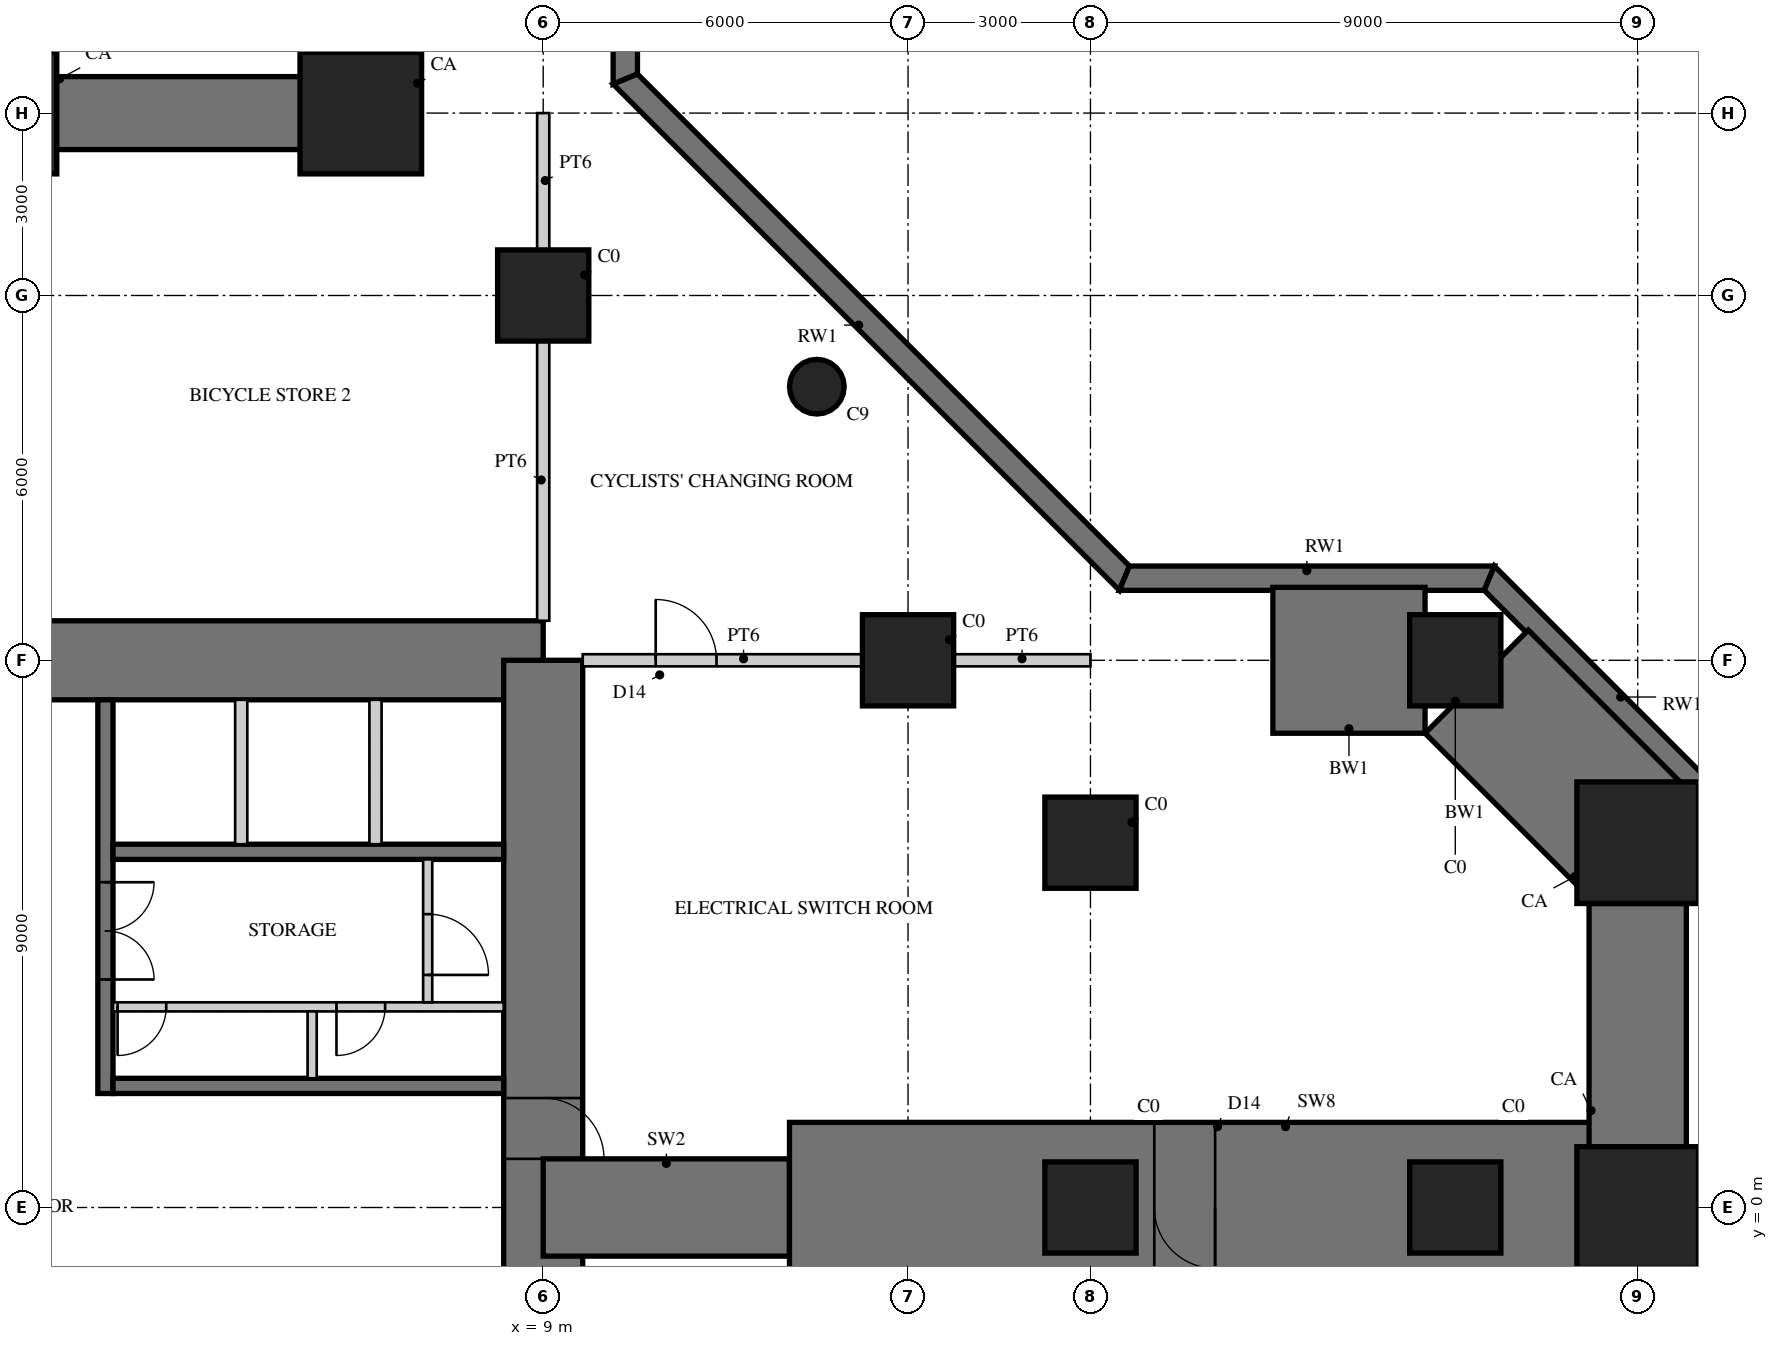
"""IFC4 building model, lengths in metres.
Left out: names, types, materials, properties, quantities, classifications, styles, units other than length and angle.
Written with IfcOpenShell. Run it as: python <this file> out.ifc"""

import sys

from ifc_helpers import new_model, si_unit, direction, frame, frame_2d, origin, origin_2d, place, context, subcontext, project, spatial, polyline, rectangle, circle, outline, extrude, element, fill, save


model = new_model("IFC4")
c1 = context("Model", 3, precision=1e-05, world=origin(), true_north=direction((0.0, 1.0)))
c2 = subcontext(c1, "Body", "Model", "MODEL_VIEW")
j1 = project(units=[si_unit("LENGTHUNIT", "METRE"), si_unit("PLANEANGLEUNIT", "RADIAN")], contexts=[c1])
p1 = place(None, origin())
s1 = spatial("IfcSite", under=j1, at=p1, CompositionType="ELEMENT")
p2 = place(p1, origin())
s2 = spatial("IfcBuilding", under=s1, at=p2, CompositionType="ELEMENT")
p3 = place(p2, frame((0.0, 0.0, -4.0)))
s3 = spatial("IfcBuildingStorey", under=s2, at=p3, CompositionType="ELEMENT", Elevation=-4.0)
p4 = place(p3, origin())
e1 = element("IfcWall", 1, at=p4, inside=s3, PredefinedType="SOLIDWALL", context=c2, shape_type="SweptSolid", body=[
    extrude(outline(polyline([(10.15, 24.476), (10.55, 24.642), (10.55, 18.642), (10.15, 18.476), (10.15, 24.476)])), origin(), (0.0, 0.0, 1.0), 4.0),
])
p5 = place(p3, origin())
e2 = element("IfcWall", 2, at=p5, inside=s3, PredefinedType="SOLIDWALL", context=c2, shape_type="SweptSolid", body=[
    extrude(outline(polyline([(10.15, 18.476), (10.55, 18.642), (18.642, 10.55), (18.476, 10.15), (10.15, 18.476)])), origin(), (0.0, 0.0, 1.0), 4.0),
])
p6 = place(p3, origin())
e3 = element("IfcWall", 3, at=p6, inside=s3, PredefinedType="SOLIDWALL", context=c2, shape_type="SweptSolid", body=[
    extrude(outline(polyline([(18.476, 10.15), (18.642, 10.55), (24.642, 10.55), (24.476, 10.15), (18.476, 10.15)])), origin(), (0.0, 0.0, 1.0), 4.0),
])
p7 = place(p3, origin())
e4 = element("IfcWall", 4, at=p7, inside=s3, PredefinedType="SOLIDWALL", context=c2, shape_type="SweptSolid", body=[
    extrude(outline(polyline([(24.476, 10.15), (24.642, 10.55), (28.55, 6.642), (28.15, 6.476), (24.476, 10.15)])), origin(), (0.0, 0.0, 1.0), 4.0),
])
p8 = place(p3, frame((9.0, 9.0, 0.0), z_axis=(0.0, 0.0, 1.0), x_axis=(-1.0, 0.0, 0.0)))
e5 = element("IfcWall", 5, at=p8, inside=s3, PredefinedType="SHEAR", context=c2, shape_type="SweptSolid", body=[
    extrude(rectangle(XDim=18.0, YDim=1.3, at=frame_2d((9.0, 0.0))), origin(), (0.0, 0.0, 1.0), 4.0),
])
p9 = place(p8, frame((9.8, 0.0, 0.0)))
e6 = element("IfcOpeningElement", 6, at=p9, cuts=e5, PredefinedType="OPENING", context=c2, shape_type="SweptSolid", body=[
    extrude(rectangle(XDim=1.0, YDim=2.4, at=frame_2d((0.5, 1.2))), frame((0.0, 0.66, 0.0), z_axis=(0.0, -1.0, 0.0), x_axis=(1.0, 0.0, 0.0)), (0.0, 0.0, 1.0), 1.32),
])
p10 = place(p3, frame((9.0, -9.0, 0.0), z_axis=(0.0, 0.0, 1.0), x_axis=(0.0, 1.0, 0.0)))
e7 = element("IfcWall", 7, at=p10, inside=s3, PredefinedType="SHEAR", context=c2, shape_type="SweptSolid", body=[
    extrude(rectangle(XDim=18.0, YDim=1.3, at=frame_2d((9.0, 0.0))), origin(), (0.0, 0.0, 1.0), 4.0),
])
p11 = place(p10, frame((9.8, 0.0, 0.0)))
e8 = element("IfcOpeningElement", 8, at=p11, cuts=e7, PredefinedType="OPENING", context=c2, shape_type="SweptSolid", body=[
    extrude(rectangle(XDim=1.0, YDim=2.4, at=frame_2d((0.5, 1.2))), frame((0.0, 0.66, 0.0), z_axis=(0.0, -1.0, 0.0), x_axis=(1.0, 0.0, 0.0)), (0.0, 0.0, 1.0), 1.32),
])
p12 = place(p3, frame((1.8, 1.875, 0.0), z_axis=(0.0, 0.0, 1.0), x_axis=(0.0, 1.0, 0.0)))
e9 = element("IfcWall", 9, at=p12, inside=s3, PredefinedType="SHEAR", context=c2, shape_type="SweptSolid", body=[
    extrude(rectangle(XDim=6.475, YDim=0.25, at=frame_2d((3.238, 0.0))), origin(), (0.0, 0.0, 1.0), 4.0),
])
p13 = place(p12, frame((1.875, 0.0, 0.0)))
e10 = element("IfcOpeningElement", 10, at=p13, cuts=e9, PredefinedType="OPENING", context=c2, shape_type="SweptSolid", body=[
    extrude(rectangle(XDim=1.6, YDim=2.4, at=frame_2d((0.8, 1.2))), frame((0.0, 0.135, 0.0), z_axis=(0.0, -1.0, 0.0), x_axis=(1.0, 0.0, 0.0)), (0.0, 0.0, 1.0), 0.27),
])
for number, where, z_axis, x_axis in (
    (11, (1.925, 2.0, 0.0), (0.0, 0.0, 1.0), (1.0, 0.0, 0.0)),
    (12, (1.925, 5.85, 0.0), (0.0, 0.0, 1.0), (1.0, 0.0, 0.0)),
):
    element("IfcWall", number, at=place(p3, frame(where, z_axis=z_axis, x_axis=x_axis)), inside=s3, PredefinedType="SHEAR", context=c2, shape_type="SweptSolid", body=[
        extrude(rectangle(XDim=6.425, YDim=0.25, at=frame_2d((3.212, 0.0))), origin(), (0.0, 0.0, 1.0), 4.0),
    ])
p14 = place(p3, frame((1.925, 3.3, 0.0), z_axis=(0.0, 0.0, 1.0), x_axis=(1.0, 0.0, 0.0)))
e13 = element("IfcWall", 13, at=p14, inside=s3, PredefinedType="PARTITIONING", context=c2, shape_type="SweptSolid", body=[
    extrude(rectangle(XDim=6.425, YDim=0.15, at=frame_2d((3.212, 0.0))), origin(), (0.0, 0.0, 1.0), 4.0),
])
p15 = place(p14, frame((0.075, 0.0, 0.0)))
e14 = element("IfcOpeningElement", 14, at=p15, cuts=e13, PredefinedType="OPENING", context=c2, shape_type="SweptSolid", body=[
    extrude(rectangle(XDim=0.8, YDim=2.1, at=frame_2d((0.4, 1.05))), frame((0.0, 0.085, 0.0), z_axis=(0.0, -1.0, 0.0), x_axis=(1.0, 0.0, 0.0)), (0.0, 0.0, 1.0), 0.17),
])
p16 = place(p14, frame((3.675, 0.0, 0.0)))
e15 = element("IfcOpeningElement", 15, at=p16, cuts=e13, PredefinedType="OPENING", context=c2, shape_type="SweptSolid", body=[
    extrude(rectangle(XDim=0.8, YDim=2.1, at=frame_2d((0.4, 1.05))), frame((0.0, 0.085, 0.0), z_axis=(0.0, -1.0, 0.0), x_axis=(1.0, 0.0, 0.0)), (0.0, 0.0, 1.0), 0.17),
])
p17 = place(p3, frame((5.2, 2.125, 0.0), z_axis=(0.0, 0.0, 1.0), x_axis=(0.0, 1.0, 0.0)))
e16 = element("IfcWall", 16, at=p17, inside=s3, PredefinedType="PARTITIONING", context=c2, shape_type="SweptSolid", body=[
    extrude(rectangle(XDim=1.1, YDim=0.15, at=frame_2d((0.55, 0.0))), origin(), (0.0, 0.0, 1.0), 4.0),
])
for number, where, z_axis, x_axis in (
    (17, (4.033, 5.975, 0.0), (0.0, 0.0, 1.0), (0.0, 1.0, 0.0)),
    (18, (6.242, 5.975, 0.0), (0.0, 0.0, 1.0), (0.0, 1.0, 0.0)),
):
    element("IfcWall", number, at=place(p3, frame(where, z_axis=z_axis, x_axis=x_axis)), inside=s3, PredefinedType="PARTITIONING", context=c2, shape_type="SweptSolid", body=[
        extrude(rectangle(XDim=2.375, YDim=0.2, at=frame_2d((1.188, 0.0))), origin(), (0.0, 0.0, 1.0), 4.0),
    ])
p18 = place(p3, frame((0.0, 18.0, 0.0), z_axis=(0.0, 0.0, 1.0), x_axis=(1.0, 0.0, 0.0)))
e19 = element("IfcWall", 19, at=p18, inside=s3, PredefinedType="SHEAR", context=c2, shape_type="SweptSolid", body=[
    extrude(rectangle(XDim=6.0, YDim=1.2, at=frame_2d((3.0, 0.0))), origin(), (0.0, 0.0, 1.0), 4.0),
])
p19 = place(p3, frame((9.0, 0.0, 0.0), z_axis=(0.0, 0.0, 1.0), x_axis=(1.0, 0.0, 0.0)))
e20 = element("IfcWall", 20, at=p19, inside=s3, PredefinedType="SHEAR", context=c2, shape_type="SweptSolid", body=[
    extrude(rectangle(XDim=4.05, YDim=1.6, at=frame_2d((2.025, 0.0))), origin(), (0.0, 0.0, 1.0), 4.0),
])
p20 = place(p3, frame((13.05, 0.0, 0.0), z_axis=(0.0, 0.0, 1.0), x_axis=(1.0, 0.0, 0.0)))
e21 = element("IfcWall", 21, at=p20, inside=s3, PredefinedType="SHEAR", context=c2, shape_type="SweptSolid", body=[
    extrude(rectangle(XDim=13.95, YDim=2.8, at=frame_2d((6.975, 0.0))), origin(), (0.0, 0.0, 1.0), 4.0),
])
p21 = place(p20, frame((6.0, 0.0, 0.0)))
e22 = element("IfcOpeningElement", 22, at=p21, cuts=e21, PredefinedType="OPENING", context=c2, shape_type="SweptSolid", body=[
    extrude(rectangle(XDim=1.0, YDim=2.2, at=frame_2d((0.5, 1.1))), frame((0.0, 1.41, 0.0), z_axis=(0.0, -1.0, 0.0), x_axis=(1.0, 0.0, 0.0)), (0.0, 0.0, 1.0), 2.82),
])
p22 = place(p3, frame((21.0, 9.0, 0.0), z_axis=(0.0, 0.0, 1.0), x_axis=(1.0, 0.0, 0.0)))
e23 = element("IfcWall", 23, at=p22, inside=s3, PredefinedType="SHEAR", context=c2, shape_type="SweptSolid", body=[
    extrude(rectangle(XDim=2.503, YDim=2.4, at=frame_2d((1.251, 0.0))), origin(), (0.0, 0.0, 1.0), 4.0),
])
p23 = place(p3, frame((24.352, 8.648, 0.0), z_axis=(0.0, 0.0, 1.0), x_axis=(0.707106781187, -0.707106781187, 0.0)))
e24 = element("IfcWall", 24, at=p23, inside=s3, PredefinedType="SHEAR", context=c2, shape_type="SweptSolid", body=[
    extrude(rectangle(XDim=3.745, YDim=2.4, at=frame_2d((1.873, 0.0))), origin(), (0.0, 0.0, 1.0), 4.0),
])
p24 = place(p3, frame((27.0, -5.0, 0.0), z_axis=(0.0, 0.0, 1.0), x_axis=(0.0, 1.0, 0.0)))
e25 = element("IfcWall", 25, at=p24, inside=s3, PredefinedType="SHEAR", context=c2, shape_type="SweptSolid", body=[
    extrude(rectangle(XDim=10.0, YDim=1.6, at=frame_2d((5.0, 0.0))), origin(), (0.0, 0.0, 1.0), 4.0),
])
for number, where, z_axis, x_axis in (
    (26, (9.0, 15.0, 0.0), (0.0, 0.0, 1.0), (1.0, 0.0, 0.0)),
    (27, (15.0, 9.0, 0.0), (0.0, 0.0, 1.0), (1.0, 0.0, 0.0)),
    (28, (24.0, 9.0, 0.0), (0.0, 0.0, 1.0), (1.0, 0.0, 0.0)),
):
    element("IfcColumn", number, at=place(p3, frame(where, z_axis=z_axis, x_axis=x_axis)), inside=s3, PredefinedType="COLUMN", context=c2, shape_type="SweptSolid", body=[
        extrude(rectangle(XDim=1.5, YDim=1.5, at=origin_2d()), origin(), (0.0, 0.0, 1.0), 4.0),
    ])
for number, where, z_axis, x_axis in (
    (29, (27.0, 0.0, 0.0), (0.0, 0.0, 1.0), (1.0, 0.0, 0.0)),
    (30, (27.0, 6.0, 0.0), (0.0, 0.0, 1.0), (1.0, 0.0, 0.0)),
    (31, (6.0, 18.0, 0.0), (0.0, 0.0, 1.0), (1.0, 0.0, 0.0)),
    (32, (0.0, 18.0, 0.0), (0.0, 0.0, 1.0), (1.0, 0.0, 0.0)),
):
    element("IfcColumn", number, at=place(p3, frame(where, z_axis=z_axis, x_axis=x_axis)), inside=s3, PredefinedType="COLUMN", context=c2, shape_type="SweptSolid", body=[
        extrude(rectangle(XDim=2.0, YDim=2.0, at=origin_2d()), origin(), (0.0, 0.0, 1.0), 4.0),
    ])
for number, where, z_axis, x_axis in (
    (33, (18.0, 0.0, 0.0), (0.0, 0.0, 1.0), (1.0, 0.0, 0.0)),
    (34, (18.0, 6.0, 0.0), (0.0, 0.0, 1.0), (1.0, 0.0, 0.0)),
    (35, (24.0, 0.0, 0.0), (0.0, 0.0, 1.0), (1.0, 0.0, 0.0)),
):
    element("IfcColumn", number, at=place(p3, frame(where, z_axis=z_axis, x_axis=x_axis)), inside=s3, PredefinedType="COLUMN", context=c2, shape_type="SweptSolid", body=[
        extrude(rectangle(XDim=1.5, YDim=1.5, at=origin_2d()), origin(), (0.0, 0.0, 1.0), 4.0),
    ])
p25 = place(p3, frame((13.5, 13.5, 0.0), z_axis=(0.0, 0.0, 1.0), x_axis=(1.0, 0.0, 0.0)))
e36 = element("IfcColumn", 36, at=p25, inside=s3, PredefinedType="COLUMN", context=c2, shape_type="SweptSolid", body=[
    extrude(circle(Radius=0.45, at=origin_2d()), origin(), (0.0, 0.0, 1.0), 4.0),
])
p26 = place(p3, frame((7.1, 3.375, 0.0), z_axis=(0.0, 0.0, 1.0), x_axis=(0.0, 1.0, 0.0)))
e37 = element("IfcWall", 37, at=p26, inside=s3, PredefinedType="PARTITIONING", context=c2, shape_type="SweptSolid", body=[
    extrude(rectangle(XDim=2.35, YDim=0.15, at=frame_2d((1.175, 0.0))), origin(), (0.0, 0.0, 1.0), 3.7),
])
p27 = place(p26, frame((0.45, 0.0, 0.0)))
e38 = element("IfcOpeningElement", 38, at=p27, cuts=e37, PredefinedType="OPENING", context=c2, shape_type="SweptSolid", body=[
    extrude(rectangle(XDim=1.0, YDim=2.1, at=frame_2d((0.5, 1.05))), frame((0.0, 0.085, 0.0), z_axis=(0.0, -1.0, 0.0), x_axis=(1.0, 0.0, 0.0)), (0.0, 0.0, 1.0), 0.17),
])
p28 = place(p3, frame((9.65, 9.0, 0.0), z_axis=(0.0, 0.0, 1.0), x_axis=(1.0, 0.0, 0.0)))
e39 = element("IfcWall", 39, at=p28, inside=s3, PredefinedType="SOLIDWALL", context=c2, shape_type="SweptSolid", body=[
    extrude(rectangle(XDim=4.6, YDim=0.2, at=frame_2d((2.3, 0.0))), origin(), (0.0, 0.0, 1.0), 2.7),
])
p29 = place(p28, frame((1.2, 0.0, 0.0)))
e40 = element("IfcOpeningElement", 40, at=p29, cuts=e39, PredefinedType="OPENING", context=c2, shape_type="SweptSolid", body=[
    extrude(rectangle(XDim=1.0, YDim=2.2, at=frame_2d((0.5, 1.1))), frame((0.0, 0.11, 0.0), z_axis=(0.0, -1.0, 0.0), x_axis=(1.0, 0.0, 0.0)), (0.0, 0.0, 1.0), 0.22),
])
p30 = place(p3, frame((15.75, 9.0, 0.0), z_axis=(0.0, 0.0, 1.0), x_axis=(1.0, 0.0, 0.0)))
e41 = element("IfcWall", 41, at=p30, inside=s3, PredefinedType="SOLIDWALL", context=c2, shape_type="SweptSolid", body=[
    extrude(rectangle(XDim=2.25, YDim=0.2, at=frame_2d((1.125, 0.0))), origin(), (0.0, 0.0, 1.0), 2.7),
])
p31 = place(p3, frame((9.0, 14.25, 0.0), z_axis=(0.0, 0.0, 1.0), x_axis=(0.0, -1.0, 0.0)))
e42 = element("IfcWall", 42, at=p31, inside=s3, PredefinedType="SOLIDWALL", context=c2, shape_type="SweptSolid", body=[
    extrude(rectangle(XDim=4.6, YDim=0.2, at=frame_2d((2.3, 0.0))), origin(), (0.0, 0.0, 1.0), 2.7),
])
p32 = place(p3, frame((9.0, 18.0, 0.0), z_axis=(0.0, 0.0, 1.0), x_axis=(0.0, -1.0, 0.0)))
e43 = element("IfcWall", 43, at=p32, inside=s3, PredefinedType="SOLIDWALL", context=c2, shape_type="SweptSolid", body=[
    extrude(rectangle(XDim=2.25, YDim=0.2, at=frame_2d((1.125, 0.0))), origin(), (0.0, 0.0, 1.0), 2.7),
])
p33 = place(p27, frame((1.0, 0.0, 0.0), z_axis=(0.0, 0.0, 1.0), x_axis=(-1.0, 0.0, 0.0)))
e44 = element("IfcDoor", 44, at=p33, inside=s3, OperationType="SINGLE_SWING_RIGHT", PredefinedType="DOOR", context=c2, shape_type="SweptSolid", body=[
    extrude(rectangle(XDim=1.0, YDim=2.1, at=frame_2d((0.5, 1.05))), frame((0.0, 0.025, 0.0), z_axis=(0.0, -1.0, 0.0), x_axis=(1.0, 0.0, 0.0)), (0.0, 0.0, 1.0), 0.05),
])
fill(e38, e44)
p34 = place(p29, origin())
e45 = element("IfcDoor", 45, at=p34, inside=s3, OperationType="SINGLE_SWING_LEFT", PredefinedType="DOOR", context=c2, shape_type="SweptSolid", body=[
    extrude(rectangle(XDim=1.0, YDim=2.2, at=frame_2d((0.5, 1.1))), frame((0.0, 0.025, 0.0), z_axis=(0.0, -1.0, 0.0), x_axis=(1.0, 0.0, 0.0)), (0.0, 0.0, 1.0), 0.05),
])
fill(e40, e45)
p35 = place(p21, frame((1.0, 0.0, 0.0), z_axis=(0.0, 0.0, 1.0), x_axis=(-1.0, 0.0, 0.0)))
e46 = element("IfcDoor", 46, at=p35, inside=s3, OperationType="SINGLE_SWING_LEFT", PredefinedType="DOOR", context=c2, shape_type="SweptSolid", body=[
    extrude(rectangle(XDim=1.0, YDim=2.2, at=frame_2d((0.5, 1.1))), frame((0.0, 0.025, 0.0), z_axis=(0.0, -1.0, 0.0), x_axis=(1.0, 0.0, 0.0)), (0.0, 0.0, 1.0), 0.05),
])
fill(e22, e46)
p36 = place(p11, frame((1.0, 0.0, 0.0), z_axis=(0.0, 0.0, 1.0), x_axis=(-1.0, 0.0, 0.0)))
e47 = element("IfcDoor", 47, at=p36, inside=s3, OperationType="SINGLE_SWING_RIGHT", PredefinedType="DOOR", context=c2, shape_type="SweptSolid", body=[
    extrude(rectangle(XDim=1.0, YDim=2.4, at=frame_2d((0.5, 1.2))), frame((0.0, -0.005, 0.0), z_axis=(0.0, -1.0, 0.0), x_axis=(1.0, 0.0, 0.0)), (0.0, 0.0, 1.0), 0.05),
])
fill(e8, e47)
p37 = place(p13, frame((1.6, 0.0, 0.0), z_axis=(0.0, 0.0, 1.0), x_axis=(-1.0, 0.0, 0.0)))
e48 = element("IfcDoor", 48, at=p37, inside=s3, OperationType="DOUBLE_DOOR_SINGLE_SWING", PredefinedType="DOOR", context=c2, shape_type="SweptSolid", body=[
    extrude(rectangle(XDim=1.6, YDim=2.4, at=frame_2d((0.8, 1.2))), frame((0.0, 0.025, 0.0), z_axis=(0.0, -1.0, 0.0), x_axis=(1.0, 0.0, 0.0)), (0.0, 0.0, 1.0), 0.05),
])
fill(e10, e48)
p38 = place(p15, frame((0.8, 0.0, 0.0), z_axis=(0.0, 0.0, 1.0), x_axis=(-1.0, 0.0, 0.0)))
e49 = element("IfcDoor", 49, at=p38, inside=s3, OperationType="SINGLE_SWING_RIGHT", PredefinedType="DOOR", context=c2, shape_type="SweptSolid", body=[
    extrude(rectangle(XDim=0.8, YDim=2.1, at=frame_2d((0.4, 1.05))), frame((0.0, 0.025, 0.0), z_axis=(0.0, -1.0, 0.0), x_axis=(1.0, 0.0, 0.0)), (0.0, 0.0, 1.0), 0.05),
])
fill(e14, e49)
p39 = place(p16, frame((0.8, 0.0, 0.0), z_axis=(0.0, 0.0, 1.0), x_axis=(-1.0, 0.0, 0.0)))
e50 = element("IfcDoor", 50, at=p39, inside=s3, OperationType="SINGLE_SWING_RIGHT", PredefinedType="DOOR", context=c2, shape_type="SweptSolid", body=[
    extrude(rectangle(XDim=0.8, YDim=2.1, at=frame_2d((0.4, 1.05))), frame((0.0, 0.025, 0.0), z_axis=(0.0, -1.0, 0.0), x_axis=(1.0, 0.0, 0.0)), (0.0, 0.0, 1.0), 0.05),
])
fill(e15, e50)
save(model, sys.argv[1])
